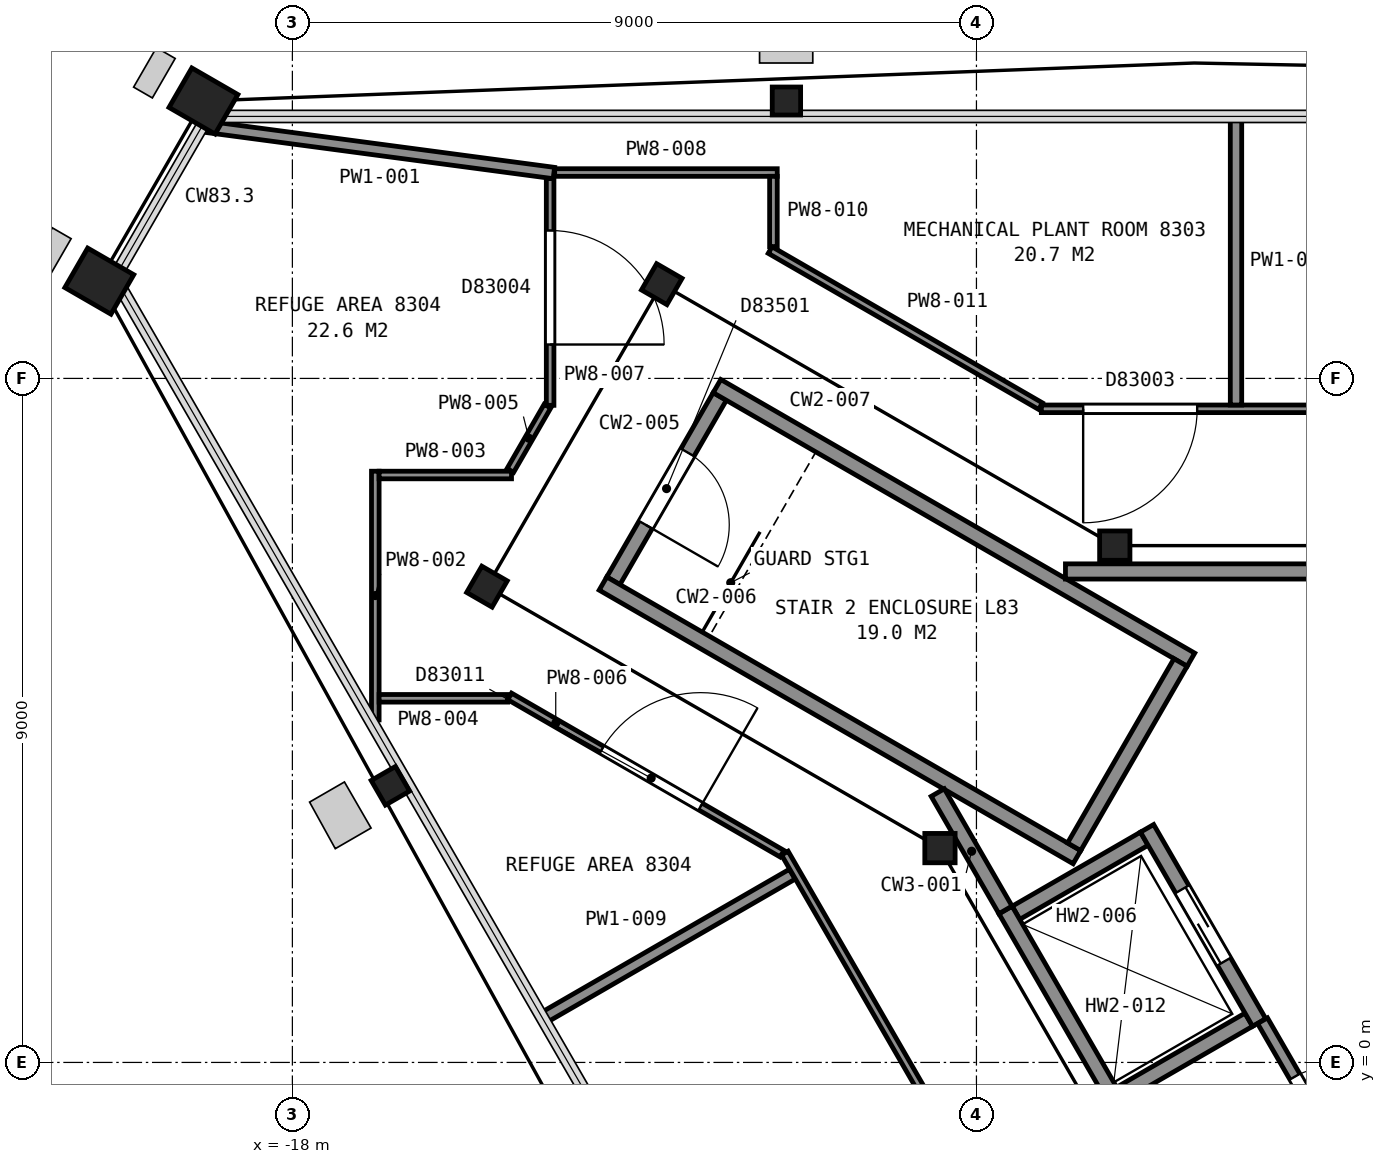
"""IFC4 building model, lengths in metres.
Left out: names, types, materials, properties, quantities, classifications, styles, units other than length and angle.
Written with IfcOpenShell. Run it as: python <this file> out.ifc"""

import sys

from ifc_helpers import new_model, si_unit, direction, frame, frame_2d, origin, origin_2d, place, context, subcontext, project, spatial, rectangle, hollow_rectangle, i_section, extrude, element, fill, save


model = new_model("IFC4")
c1 = context("Model", 3, precision=1e-05, world=origin(), true_north=direction((0.0, 1.0)))
c2 = subcontext(c1, "Body", "Model", "MODEL_VIEW")
j1 = project(units=[si_unit("LENGTHUNIT", "METRE"), si_unit("PLANEANGLEUNIT", "RADIAN")], contexts=[c1])
p1 = place(None, origin())
s1 = spatial("IfcSite", under=j1, at=p1, CompositionType="ELEMENT")
p2 = place(p1, origin())
s2 = spatial("IfcBuilding", under=s1, at=p2, CompositionType="ELEMENT")
p3 = place(p2, frame((0.0, 0.0, 329.4)))
s3 = spatial("IfcBuildingStorey", under=s2, at=p3, CompositionType="ELEMENT", Elevation=329.4)
p4 = place(p3, frame((-11.5, 12.65, 0.0), z_axis=(0.0, 0.0, 1.0), x_axis=(1.0, 0.0, 0.0)))
e1 = element("IfcColumn", 1, at=p4, inside=s3, PredefinedType="COLUMN", context=c2, shape_type="SweptSolid", body=[
    extrude(i_section(OverallWidth=0.373, OverallDepth=0.368, WebThickness=0.015, FlangeThickness=0.024, FilletRadius=0.015, at=origin_2d()), origin(), (0.0, 0.0, 1.0), 4.34),
])
for number, where, z_axis, x_axis in (
    (2, (-19.17, 12.65, 0.0), (0.0, 0.0, 1.0), (0.5, 0.866, 0.0)),
    (3, (-20.54, 10.28, 0.0), (0.0, 0.0, 1.0), (0.5, 0.866, 0.0)),
):
    element("IfcColumn", number, at=place(p3, frame(where, z_axis=z_axis, x_axis=x_axis)), inside=s3, PredefinedType="COLUMN", context=c2, shape_type="SweptSolid", body=[
        extrude(hollow_rectangle(XDim=0.6, YDim=0.7, WallThickness=0.04, at=origin_2d()), origin(), (0.0, 0.0, 1.0), 3.9),
    ])
p5 = place(p3, frame((-16.71, 3.64, 0.0), z_axis=(0.0, 0.0, 1.0), x_axis=(-0.5, 0.866025403784, 0.0)))
e4 = element("IfcColumn", 4, at=p5, inside=s3, PredefinedType="COLUMN", context=c2, shape_type="SweptSolid", body=[
    extrude(i_section(OverallWidth=0.373, OverallDepth=0.368, WebThickness=0.015, FlangeThickness=0.024, FilletRadius=0.015, at=origin_2d()), origin(), (0.0, 0.0, 1.0), 4.13),
])
for number, where, z_axis, x_axis in (
    (5, (-7.18, 6.8, 0.0), (0.0, 0.0, 1.0), (1.0, 0.0, 0.0)),
    (6, (-13.14, 10.24, 0.0), (0.0, 0.0, 1.0), (0.5, 0.866, 0.0)),
    (7, (-15.44, 6.26, 0.0), (0.0, 0.0, 1.0), (0.5, 0.866, 0.0)),
    (8, (-9.48, 2.82, 0.0), (0.0, 0.0, 1.0), (1.0, 0.0, 0.0)),
):
    element("IfcColumn", number, at=place(p3, frame(where, z_axis=z_axis, x_axis=x_axis)), inside=s3, PredefinedType="COLUMN", context=c2, shape_type="SweptSolid", body=[
        extrude(i_section(OverallWidth=0.399, OverallDepth=0.386, WebThickness=0.021, FlangeThickness=0.033, FilletRadius=0.015, at=origin_2d()), origin(), (0.0, 0.0, 1.0), 4.2),
    ])
p6 = place(p3, frame((-12.377, 8.762, 0.0), z_axis=(0.0, 0.0, 1.0), x_axis=(-0.500049511043, -0.865996816683, 0.0)))
e9 = element("IfcWall", 9, at=p6, inside=s3, PredefinedType="PARTITIONING", context=c2, shape_type="SweptSolid", body=[
    extrude(rectangle(XDim=2.8, YDim=0.2, at=frame_2d((1.4, 0.0))), origin(), (0.0, 0.0, 1.0), 4.2),
])
p7 = place(p6, frame((0.85, 0.0, 0.0)))
e10 = element("IfcOpeningElement", 10, at=p7, cuts=e9, PredefinedType="OPENING", context=c2, shape_type="SweptSolid", body=[
    extrude(rectangle(XDim=1.1, YDim=2.1, at=frame_2d((0.55, 1.05))), frame((0.0, 0.11, 0.0), z_axis=(0.0, -1.0, 0.0), x_axis=(1.0, 0.0, 0.0)), (0.0, 0.0, 1.0), 0.22),
])
for number, where, z_axis, x_axis in (
    (11, (-7.678, 2.701, 0.0), (0.0, 0.0, 1.0), (-0.866, 0.5, 0.0)),
    (12, (-6.178, 5.299, 0.0), (0.0, 0.0, 1.0), (-0.866, 0.5, 0.0)),
):
    element("IfcWall", number, at=place(p3, frame(where, z_axis=z_axis, x_axis=x_axis)), inside=s3, PredefinedType="PARTITIONING", context=c2, shape_type="SweptSolid", body=[
        extrude(rectangle(XDim=7.2, YDim=0.2, at=frame_2d((3.6, 0.0))), origin(), (0.0, 0.0, 1.0), 4.2),
    ])
p8 = place(p3, frame((-6.315, 5.262, 0.0), z_axis=(0.0, 0.0, 1.0), x_axis=(-0.500049511043, -0.865996816683, 0.0)))
e13 = element("IfcWall", 13, at=p8, inside=s3, PredefinedType="PARTITIONING", context=c2, shape_type="SweptSolid", body=[
    extrude(rectangle(XDim=2.8, YDim=0.2, at=frame_2d((1.4, 0.0))), origin(), (0.0, 0.0, 1.0), 4.2),
])
for number, where, z_axis, x_axis in (
    (14, (-7.105, -0.413, 0.0), (0.0, 0.0, 1.0), (0.866, 0.5, 0.0)),
    (15, (-8.48, 1.969, 0.0), (0.0, 0.0, 1.0), (0.866, 0.5, 0.0)),
):
    element("IfcWall", number, at=place(p3, frame(where, z_axis=z_axis, x_axis=x_axis)), inside=s3, PredefinedType="PARTITIONING", context=c2, shape_type="SweptSolid", body=[
        extrude(rectangle(XDim=1.95, YDim=0.2, at=frame_2d((0.975, 0.0))), origin(), (0.0, 0.0, 1.0), 4.2),
    ])
p9 = place(p3, frame((-5.28, 0.525, 0.0), z_axis=(0.0, 0.0, 1.0), x_axis=(-0.500037662692, 0.866003658127, 0.0)))
e16 = element("IfcWall", 16, at=p9, inside=s3, PredefinedType="PARTITIONING", context=c2, shape_type="SweptSolid", body=[
    extrude(rectangle(XDim=2.95, YDim=0.2, at=frame_2d((1.475, 0.0))), origin(), (0.0, 0.0, 1.0), 4.2),
])
p10 = place(p9, frame((0.925, 0.0, 0.0)))
e17 = element("IfcOpeningElement", 17, at=p10, cuts=e16, PredefinedType="OPENING", context=c2, shape_type="SweptSolid", body=[
    extrude(rectangle(XDim=1.1, YDim=2.1, at=frame_2d((0.55, 1.05))), frame((0.0, 0.11, 0.0), z_axis=(0.0, -1.0, 0.0), x_axis=(1.0, 0.0, 0.0)), (0.0, 0.0, 1.0), 0.22),
])
p11 = place(p3, frame((-7.142, -0.55, 0.0), z_axis=(0.0, 0.0, 1.0), x_axis=(-0.49997559174, 0.866039495442, 0.0)))
e18 = element("IfcWall", 18, at=p11, inside=s3, PredefinedType="PARTITIONING", context=c2, shape_type="SweptSolid", body=[
    extrude(rectangle(XDim=2.95, YDim=0.2, at=frame_2d((1.475, 0.0))), origin(), (0.0, 0.0, 1.0), 4.2),
])
p12 = place(p3, frame((-9.509, 3.551, 0.0), z_axis=(0.0, 0.0, 1.0), x_axis=(0.499999136801, -0.866025902152, 0.0)))
e19 = element("IfcWall", 19, at=p12, inside=s3, PredefinedType="PARTITIONING", context=c2, shape_type="SweptSolid", body=[
    extrude(rectangle(XDim=1.782, YDim=0.2, at=frame_2d((0.891, 0.0))), origin(), (0.0, 0.0, 1.0), 3.9),
])
p13 = place(p3, frame((7.829, 6.46, 0.0), z_axis=(0.0, 0.0, 1.0), x_axis=(-1.0, 0.0, 0.0)))
e20 = element("IfcWall", 20, at=p13, inside=s3, PredefinedType="PARTITIONING", context=c2, shape_type="SweptSolid", body=[
    extrude(rectangle(XDim=15.658, YDim=0.2, at=frame_2d((7.829, 0.0))), origin(), (0.0, 0.0, 1.0), 3.9),
])
p14 = place(p13, frame((2.618, 0.0, 0.0)))
e21 = element("IfcOpeningElement", 21, at=p14, cuts=e20, PredefinedType="OPENING", context=c2, shape_type="SweptSolid", body=[
    extrude(rectangle(XDim=1.8, YDim=2.1, at=frame_2d((0.9, 1.05))), frame((0.0, 0.11, 0.0), z_axis=(0.0, -1.0, 0.0), x_axis=(1.0, 0.0, 0.0)), (0.0, 0.0, 1.0), 0.22),
])
p15 = place(p3, frame((-3.882, -1.797, 0.0), z_axis=(0.0, 0.0, 1.0), x_axis=(-0.500016307898, 0.86601598821, 0.0)))
e22 = element("IfcWall", 22, at=p15, inside=s3, PredefinedType="PARTITIONING", context=c2, shape_type="SweptSolid", body=[
    extrude(rectangle(XDim=2.709, YDim=0.15, at=frame_2d((1.354, 0.0))), origin(), (0.0, 0.0, 1.0), 3.9),
])
p16 = place(p15, frame((0.959, 0.0, 0.0)))
e23 = element("IfcOpeningElement", 23, at=p16, cuts=e22, PredefinedType="OPENING", context=c2, shape_type="SweptSolid", body=[
    extrude(rectangle(XDim=0.9, YDim=2.1, at=frame_2d((0.45, 1.05))), frame((0.0, 0.085, 0.0), z_axis=(0.0, -1.0, 0.0), x_axis=(1.0, 0.0, 0.0)), (0.0, 0.0, 1.0), 0.17),
])
p17 = place(p3, frame((-19.143, 12.312, 0.0), z_axis=(0.0, 0.0, 1.0), x_axis=(0.991256927963, -0.131945832693, 0.0)))
e24 = element("IfcWall", 24, at=p17, inside=s3, PredefinedType="PARTITIONING", context=c2, shape_type="SweptSolid", body=[
    extrude(rectangle(XDim=4.624, YDim=0.15, at=frame_2d((2.312, 0.0))), origin(), (0.0, 0.0, 1.0), 3.297),
])
p18 = place(p3, frame((-16.909, 4.507, 0.0), z_axis=(0.0, 0.0, 1.0), x_axis=(0.0, 1.0, 0.0)))
e25 = element("IfcWall", 25, at=p18, inside=s3, PredefinedType="PARTITIONING", context=c2, shape_type="SweptSolid", body=[
    extrude(rectangle(XDim=3.272, YDim=0.1, at=frame_2d((1.636, 0.0))), origin(), (0.0, 0.0, 1.0), 3.297),
])
p19 = place(p3, frame((-16.859, 7.729, 0.0), z_axis=(0.0, 0.0, 1.0), x_axis=(1.0, 0.0, 0.0)))
e26 = element("IfcWall", 26, at=p19, inside=s3, PredefinedType="PARTITIONING", context=c2, shape_type="SweptSolid", body=[
    extrude(rectangle(XDim=1.742, YDim=0.1, at=frame_2d((0.871, 0.0))), origin(), (0.0, 0.0, 1.0), 3.297),
])
p20 = place(p3, frame((-16.859, 4.791, 0.0), z_axis=(0.0, 0.0, 1.0), x_axis=(1.0, 0.0, 0.0)))
e27 = element("IfcWall", 27, at=p20, inside=s3, PredefinedType="PARTITIONING", context=c2, shape_type="SweptSolid", body=[
    extrude(rectangle(XDim=1.691, YDim=0.1, at=frame_2d((0.845, 0.0))), origin(), (0.0, 0.0, 1.0), 3.297),
])
p21 = place(p3, frame((-15.132, 7.79, 0.0), z_axis=(0.0, 0.0, 1.0), x_axis=(0.499823463829, 0.866127303003, 0.0)))
e28 = element("IfcWall", 28, at=p21, inside=s3, PredefinedType="PARTITIONING", context=c2, shape_type="SweptSolid", body=[
    extrude(rectangle(XDim=0.976, YDim=0.1, at=frame_2d((0.488, 0.0))), origin(), (0.0, 0.0, 1.0), 3.297),
])
p22 = place(p3, frame((-11.557, 2.746, 0.0), z_axis=(0.0, 0.0, 1.0), x_axis=(-0.866005840187, 0.500033883614, 0.0)))
e29 = element("IfcWall", 29, at=p22, inside=s3, PredefinedType="PARTITIONING", context=c2, shape_type="SweptSolid", body=[
    extrude(rectangle(XDim=4.139, YDim=0.1, at=frame_2d((2.07, 0.0))), origin(), (0.0, 0.0, 1.0), 3.297),
])
p23 = place(p22, frame((1.24, 0.0, 0.0)))
e30 = element("IfcOpeningElement", 30, at=p23, cuts=e29, PredefinedType="OPENING", context=c2, shape_type="SweptSolid", body=[
    extrude(rectangle(XDim=1.5, YDim=2.1, at=frame_2d((0.75, 1.05))), frame((0.0, 0.06, 0.0), z_axis=(0.0, -1.0, 0.0), x_axis=(1.0, 0.0, 0.0)), (0.0, 0.0, 1.0), 0.12),
])
p24 = place(p3, frame((-14.609, 8.646, 0.0), z_axis=(0.0, 0.0, 1.0), x_axis=(0.0, 1.0, 0.0)))
e31 = element("IfcWall", 31, at=p24, inside=s3, PredefinedType="PARTITIONING", context=c2, shape_type="SweptSolid", body=[
    extrude(rectangle(XDim=2.983, YDim=0.1, at=frame_2d((1.491, 0.0))), origin(), (0.0, 0.0, 1.0), 3.297),
])
p25 = place(p24, frame((0.8, 0.0, 0.0)))
e32 = element("IfcOpeningElement", 32, at=p25, cuts=e31, PredefinedType="OPENING", context=c2, shape_type="SweptSolid", body=[
    extrude(rectangle(XDim=1.5, YDim=2.1, at=frame_2d((0.75, 1.05))), frame((0.0, 0.06, 0.0), z_axis=(0.0, -1.0, 0.0), x_axis=(1.0, 0.0, 0.0)), (0.0, 0.0, 1.0), 0.12),
])
p26 = place(p3, frame((-14.549, 11.709, 0.0), z_axis=(0.0, 0.0, 1.0), x_axis=(1.0, 0.0, 0.0)))
e33 = element("IfcWall", 33, at=p26, inside=s3, PredefinedType="PARTITIONING", context=c2, shape_type="SweptSolid", body=[
    extrude(rectangle(XDim=2.928, YDim=0.1, at=frame_2d((1.464, 0.0))), origin(), (0.0, 0.0, 1.0), 3.297),
])
p27 = place(p3, frame((-14.696, 0.588, 0.0), z_axis=(0.0, 0.0, 1.0), x_axis=(0.866115649152, 0.499843657852, 0.0)))
e34 = element("IfcWall", 34, at=p27, inside=s3, PredefinedType="PARTITIONING", context=c2, shape_type="SweptSolid", body=[
    extrude(rectangle(XDim=3.778, YDim=0.15, at=frame_2d((1.889, 0.0))), origin(), (0.0, 0.0, 1.0), 3.297),
])
p28 = place(p3, frame((-11.671, 10.734, 0.0), z_axis=(0.0, 0.0, 1.0), x_axis=(0.0, 1.0, 0.0)))
e35 = element("IfcWall", 35, at=p28, inside=s3, PredefinedType="PARTITIONING", context=c2, shape_type="SweptSolid", body=[
    extrude(rectangle(XDim=0.925, YDim=0.1, at=frame_2d((0.462, 0.0))), origin(), (0.0, 0.0, 1.0), 3.297),
])
p29 = place(p3, frame((-11.714, 10.689, 0.0), z_axis=(0.0, 0.0, 1.0), x_axis=(0.866029215606, -0.499993397673, 0.0)))
e36 = element("IfcWall", 36, at=p29, inside=s3, PredefinedType="PARTITIONING", context=c2, shape_type="SweptSolid", body=[
    extrude(rectangle(XDim=4.108, YDim=0.1, at=frame_2d((2.054, 0.0))), origin(), (0.0, 0.0, 1.0), 3.297),
])
p30 = place(p3, frame((-3.744, -10.714, 0.0), z_axis=(0.0, 0.0, 1.0), x_axis=(-0.500044034969, 0.86599997869, 0.0)))
e37 = element("IfcWall", 37, at=p30, inside=s3, PredefinedType="PARTITIONING", context=c2, shape_type="SweptSolid", body=[
    extrude(rectangle(XDim=15.553, YDim=0.1, at=frame_2d((7.776, 0.0))), origin(), (0.0, 0.0, 1.0), 3.297),
])
p31 = place(p30, frame((7.814, 0.0, 0.0)))
e38 = element("IfcOpeningElement", 38, at=p31, cuts=e37, PredefinedType="OPENING", context=c2, shape_type="SweptSolid", body=[
    extrude(rectangle(XDim=1.5, YDim=2.1, at=frame_2d((0.75, 1.05))), frame((0.0, 0.06, 0.0), z_axis=(0.0, -1.0, 0.0), x_axis=(1.0, 0.0, 0.0)), (0.0, 0.0, 1.0), 0.12),
])
p32 = place(p3, frame((-8.146, 8.6, 0.0), z_axis=(0.0, 0.0, 1.0), x_axis=(1.0, 0.0, 0.0)))
e39 = element("IfcWall", 39, at=p32, inside=s3, PredefinedType="PARTITIONING", context=c2, shape_type="SweptSolid", body=[
    extrude(rectangle(XDim=16.292, YDim=0.1, at=frame_2d((8.146, 0.0))), origin(), (0.0, 0.0, 1.0), 3.297),
])
p33 = place(p32, frame((8.511, 0.0, 0.0)))
e40 = element("IfcOpeningElement", 40, at=p33, cuts=e39, PredefinedType="OPENING", context=c2, shape_type="SweptSolid", body=[
    extrude(rectangle(XDim=1.5, YDim=2.1, at=frame_2d((0.75, 1.05))), frame((0.0, 0.06, 0.0), z_axis=(0.0, -1.0, 0.0), x_axis=(1.0, 0.0, 0.0)), (0.0, 0.0, 1.0), 0.12),
])
p34 = place(p32, frame((0.55, 0.0, 0.0)))
e41 = element("IfcOpeningElement", 41, at=p34, cuts=e39, PredefinedType="OPENING", context=c2, shape_type="SweptSolid", body=[
    extrude(rectangle(XDim=1.5, YDim=2.1, at=frame_2d((0.75, 1.05))), frame((0.0, 0.06, 0.0), z_axis=(0.0, -1.0, 0.0), x_axis=(1.0, 0.0, 0.0)), (0.0, 0.0, 1.0), 0.12),
])
p35 = place(p3, frame((-5.585, 8.65, 0.0), z_axis=(0.0, 0.0, 1.0), x_axis=(0.0, 1.0, 0.0)))
e42 = element("IfcWall", 42, at=p35, inside=s3, PredefinedType="PARTITIONING", context=c2, shape_type="SweptSolid", body=[
    extrude(rectangle(XDim=3.783, YDim=0.15, at=frame_2d((1.892, 0.0))), origin(), (0.0, 0.0, 1.0), 3.297),
])
p36 = place(p7, origin())
e43 = element("IfcDoor", 43, at=p36, inside=s3, OperationType="SINGLE_SWING_RIGHT", PredefinedType="DOOR", context=c2, shape_type="SweptSolid", body=[
    extrude(rectangle(XDim=1.1, YDim=2.1, at=frame_2d((0.55, 1.05))), frame((0.0, 0.025, 0.0), z_axis=(0.0, -1.0, 0.0), x_axis=(1.0, 0.0, 0.0)), (0.0, 0.0, 1.0), 0.05),
])
fill(e10, e43)
p37 = place(p10, origin())
e44 = element("IfcDoor", 44, at=p37, inside=s3, OperationType="SLIDING_TO_LEFT", PredefinedType="DOOR", context=c2, shape_type="SweptSolid", body=[
    extrude(rectangle(XDim=1.1, YDim=2.1, at=frame_2d((0.55, 1.05))), frame((0.0, 0.025, 0.0), z_axis=(0.0, -1.0, 0.0), x_axis=(1.0, 0.0, 0.0)), (0.0, 0.0, 1.0), 0.05),
])
fill(e17, e44)
p38 = place(p16, origin())
e45 = element("IfcDoor", 45, at=p38, inside=s3, OperationType="SINGLE_SWING_LEFT", PredefinedType="DOOR", context=c2, shape_type="SweptSolid", body=[
    extrude(rectangle(XDim=0.9, YDim=2.1, at=frame_2d((0.45, 1.05))), frame((0.0, 0.025, 0.0), z_axis=(0.0, -1.0, 0.0), x_axis=(1.0, 0.0, 0.0)), (0.0, 0.0, 1.0), 0.05),
])
fill(e23, e45)
p39 = place(p23, origin())
e46 = element("IfcDoor", 46, at=p39, inside=s3, OperationType="DOUBLE_DOOR_SINGLE_SWING", PredefinedType="DOOR", context=c2, shape_type="SweptSolid", body=[
    extrude(rectangle(XDim=1.5, YDim=2.1, at=frame_2d((0.75, 1.05))), frame((0.0, 0.025, 0.0), z_axis=(0.0, -1.0, 0.0), x_axis=(1.0, 0.0, 0.0)), (0.0, 0.0, 1.0), 0.05),
])
fill(e30, e46)
p40 = place(p25, origin())
e47 = element("IfcDoor", 47, at=p40, inside=s3, OperationType="DOUBLE_DOOR_SINGLE_SWING", PredefinedType="DOOR", context=c2, shape_type="SweptSolid", body=[
    extrude(rectangle(XDim=1.5, YDim=2.1, at=frame_2d((0.75, 1.05))), frame((0.0, 0.025, 0.0), z_axis=(0.0, -1.0, 0.0), x_axis=(1.0, 0.0, 0.0)), (0.0, 0.0, 1.0), 0.05),
])
fill(e32, e47)
p41 = place(p34, origin())
e48 = element("IfcDoor", 48, at=p41, inside=s3, OperationType="DOUBLE_DOOR_SINGLE_SWING", PredefinedType="DOOR", context=c2, shape_type="SweptSolid", body=[
    extrude(rectangle(XDim=1.5, YDim=2.1, at=frame_2d((0.75, 1.05))), frame((0.0, 0.025, 0.0), z_axis=(0.0, -1.0, 0.0), x_axis=(1.0, 0.0, 0.0)), (0.0, 0.0, 1.0), 0.05),
])
fill(e41, e48)
save(model, sys.argv[1])
